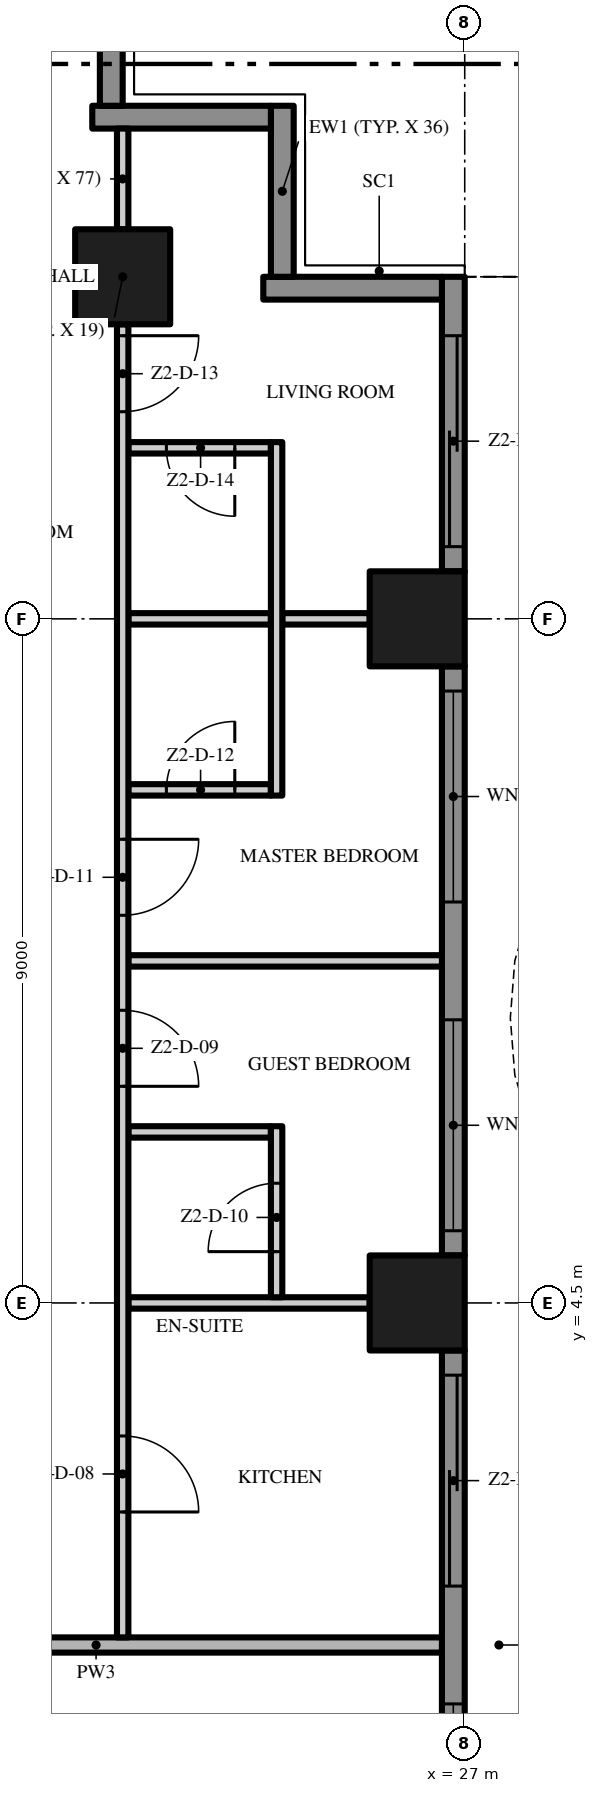
"""IFC4 building model, lengths in metres.
Left out: names, types, materials, properties, quantities, classifications, styles, units other than length and angle.
Written with IfcOpenShell. Run it as: python <this file> out.ifc"""

import sys

from ifc_helpers import new_model, si_unit, direction, frame, frame_2d, origin, origin_2d, place, context, subcontext, project, spatial, polyline, rectangle, outline, extrude, element, fill, save


model = new_model("IFC4")
c1 = context("Model", 3, precision=1e-05, world=origin(), true_north=direction((0.0, 1.0)))
c2 = subcontext(c1, "Body", "Model", "MODEL_VIEW")
j1 = project(units=[si_unit("LENGTHUNIT", "METRE"), si_unit("PLANEANGLEUNIT", "RADIAN")], contexts=[c1])
p1 = place(None, origin())
s1 = spatial("IfcSite", under=j1, at=p1, CompositionType="ELEMENT")
p2 = place(p1, origin())
s2 = spatial("IfcBuilding", under=s1, at=p2, CompositionType="ELEMENT")
p3 = place(p2, frame((0.0, 0.0, 107.4)))
s3 = spatial("IfcBuildingStorey", under=s2, at=p3, CompositionType="ELEMENT", Elevation=107.4)
for number, where, z_axis, x_axis in (
    (1, (26.375, 13.5, 0.0), (0.0, 0.0, 1.0), (1.0, 0.0, 0.0)),
    (2, (22.5, 18.0, 0.0), (0.0, 0.0, 1.0), (1.0, 0.0, 0.0)),
    (3, (26.375, 4.5, 0.0), (0.0, 0.0, 1.0), (1.0, 0.0, 0.0)),
):
    element("IfcColumn", number, at=place(p3, frame(where, z_axis=z_axis, x_axis=x_axis)), inside=s3, PredefinedType="COLUMN", context=c2, shape_type="SweptSolid", body=[
        extrude(rectangle(XDim=1.25, YDim=1.25, at=origin_2d()), origin(), (0.0, 0.0, 1.0), 3.5),
    ])
p4 = place(p3, frame((26.85, 3.875, 0.0), z_axis=(0.0, 0.0, 1.0), x_axis=(0.0, -1.0, 0.0)))
e4 = element("IfcWall", 4, at=p4, inside=s3, PredefinedType="SOLIDWALL", context=c2, shape_type="SweptSolid", body=[
    extrude(rectangle(XDim=7.75, YDim=0.3, at=frame_2d((3.875, 0.0))), origin(), (0.0, 0.0, 1.0), 3.5),
])
p5 = place(p4, frame((4.65, 0.0, 0.45)))
e5 = element("IfcOpeningElement", 5, at=p5, cuts=e4, PredefinedType="OPENING", context=c2, shape_type="SweptSolid", body=[
    extrude(rectangle(XDim=2.775, YDim=2.65, at=frame_2d((1.387, 1.325))), frame((0.0, 0.16, 0.0), z_axis=(0.0, -1.0, 0.0), x_axis=(1.0, 0.0, 0.0)), (0.0, 0.0, 1.0), 0.32),
])
p6 = place(p4, frame((0.325, 0.0, 0.0)))
e6 = element("IfcOpeningElement", 6, at=p6, cuts=e4, PredefinedType="OPENING", context=c2, shape_type="SweptSolid", body=[
    extrude(rectangle(XDim=2.775, YDim=2.4, at=frame_2d((1.387, 1.2))), frame((0.0, 0.16, 0.0), z_axis=(0.0, -1.0, 0.0), x_axis=(1.0, 0.0, 0.0)), (0.0, 0.0, 1.0), 0.32),
])
p7 = place(p3, frame((26.85, 12.875, 0.0), z_axis=(0.0, 0.0, 1.0), x_axis=(0.0, -1.0, 0.0)))
e7 = element("IfcWall", 7, at=p7, inside=s3, PredefinedType="SOLIDWALL", context=c2, shape_type="SweptSolid", body=[
    extrude(rectangle(XDim=7.75, YDim=0.3, at=frame_2d((3.875, 0.0))), origin(), (0.0, 0.0, 1.0), 3.5),
])
p8 = place(p7, frame((4.65, 0.0, 0.45)))
e8 = element("IfcOpeningElement", 8, at=p8, cuts=e7, PredefinedType="OPENING", context=c2, shape_type="SweptSolid", body=[
    extrude(rectangle(XDim=2.775, YDim=2.65, at=frame_2d((1.387, 1.325))), frame((0.0, 0.16, 0.0), z_axis=(0.0, -1.0, 0.0), x_axis=(1.0, 0.0, 0.0)), (0.0, 0.0, 1.0), 0.32),
])
p9 = place(p7, frame((0.325, 0.0, 0.45)))
e9 = element("IfcOpeningElement", 9, at=p9, cuts=e7, PredefinedType="OPENING", context=c2, shape_type="SweptSolid", body=[
    extrude(rectangle(XDim=2.775, YDim=2.65, at=frame_2d((1.387, 1.325))), frame((0.0, 0.16, 0.0), z_axis=(0.0, -1.0, 0.0), x_axis=(1.0, 0.0, 0.0)), (0.0, 0.0, 1.0), 0.32),
])
p10 = place(p3, frame((26.85, 18.0, 0.0), z_axis=(0.0, 0.0, 1.0), x_axis=(0.0, -1.0, 0.0)))
e10 = element("IfcWall", 10, at=p10, inside=s3, PredefinedType="SOLIDWALL", context=c2, shape_type="SweptSolid", body=[
    extrude(rectangle(XDim=3.875, YDim=0.3, at=frame_2d((1.938, 0.0))), origin(), (0.0, 0.0, 1.0), 3.5),
])
p11 = place(p10, frame((0.775, 0.0, 0.0)))
e11 = element("IfcOpeningElement", 11, at=p11, cuts=e10, PredefinedType="OPENING", context=c2, shape_type="SweptSolid", body=[
    extrude(rectangle(XDim=2.775, YDim=2.4, at=frame_2d((1.387, 1.2))), frame((0.0, 0.16, 0.0), z_axis=(0.0, -1.0, 0.0), x_axis=(1.0, 0.0, 0.0)), (0.0, 0.0, 1.0), 0.32),
])
p12 = place(p3, frame((24.35, 17.85, 0.0), z_axis=(0.0, 0.0, 1.0), x_axis=(1.0, 0.0, 0.0)))
e12 = element("IfcWall", 12, at=p12, inside=s3, PredefinedType="SOLIDWALL", context=c2, shape_type="SweptSolid", body=[
    extrude(rectangle(XDim=2.35, YDim=0.3, at=frame_2d((1.175, 0.0))), origin(), (0.0, 0.0, 1.0), 3.5),
])
p13 = place(p3, frame((24.6, 20.25, 0.0), z_axis=(0.0, 0.0, 1.0), x_axis=(0.0, -1.0, 0.0)))
e13 = element("IfcWall", 13, at=p13, inside=s3, PredefinedType="SOLIDWALL", context=c2, shape_type="SweptSolid", body=[
    extrude(rectangle(XDim=2.25, YDim=0.3, at=frame_2d((1.125, 0.0))), origin(), (0.0, 0.0, 1.0), 3.5),
])
p14 = place(p3, frame((22.1, 20.1, 0.0), z_axis=(0.0, 0.0, 1.0), x_axis=(1.0, 0.0, 0.0)))
e14 = element("IfcWall", 14, at=p14, inside=s3, PredefinedType="SOLIDWALL", context=c2, shape_type="SweptSolid", body=[
    extrude(rectangle(XDim=2.35, YDim=0.3, at=frame_2d((1.175, 0.0))), origin(), (0.0, 0.0, 1.0), 3.5),
])
p15 = place(p3, frame((22.35, 22.5, 0.0), z_axis=(0.0, 0.0, 1.0), x_axis=(0.0, -1.0, 0.0)))
e15 = element("IfcWall", 15, at=p15, inside=s3, PredefinedType="SOLIDWALL", context=c2, shape_type="SweptSolid", body=[
    extrude(rectangle(XDim=2.25, YDim=0.3, at=frame_2d((1.125, 0.0))), origin(), (0.0, 0.0, 1.0), 3.5),
])
p16 = place(p3, origin())
e16 = element("IfcWall", 16, at=p16, inside=s3, PredefinedType="USERDEFINED", context=c2, shape_type="SweptSolid", body=[
    extrude(outline(polyline([(28.8, -18.0), (29.505, -16.5), (29.941, -15.0), (30.0, -14.25), (29.941, -13.5), (29.505, -12.0), (28.8, -10.5), (28.095, -9.0), (27.659, -7.5), (27.6, -6.75), (27.659, -6.0), (28.095, -4.5), (28.8, -3.0), (29.505, -1.5), (29.941, 0.0), (30.0, 0.75), (29.941, 1.5), (29.505, 3.0), (28.8, 4.5), (28.095, 6.0), (27.659, 7.5), (27.6, 8.25), (27.659, 9.0), (28.095, 10.5), (28.8, 12.0), (29.505, 13.5), (29.941, 15.0), (30.0, 15.75), (29.941, 16.5), (29.505, 18.0), (29.265, 17.93), (29.694, 16.455), (29.749, 15.75), (29.694, 15.045), (29.271, 13.589), (28.574, 12.106), (27.86, 10.589), (27.411, 9.045), (27.349, 8.25), (27.411, 7.455), (27.86, 5.911), (28.574, 4.394), (29.271, 2.911), (29.694, 1.455), (29.749, 0.75), (29.694, 0.045), (29.271, -1.411), (28.574, -2.894), (27.86, -4.411), (27.411, -5.955), (27.349, -6.75), (27.411, -7.545), (27.86, -9.089), (28.574, -10.606), (29.271, -12.089), (29.694, -13.545), (29.749, -14.25), (29.694, -14.955), (29.271, -16.411), (28.574, -17.894), (28.8, -18.0)])), origin(), (0.0, 0.0, 1.0), 0.9),
])
p17 = place(p3, frame((17.6, 0.0, 0.0), z_axis=(0.0, 0.0, 1.0), x_axis=(1.0, 0.0, 0.0)))
e17 = element("IfcWall", 17, at=p17, inside=s3, PredefinedType="PARTITIONING", context=c2, shape_type="SweptSolid", body=[
    extrude(rectangle(XDim=9.1, YDim=0.2, at=frame_2d((4.55, 0.0))), origin(), (0.0, 0.0, 1.0), 3.5),
])
p18 = place(p3, frame((22.575, 4.5, 0.0), z_axis=(0.0, 0.0, 1.0), x_axis=(1.0, 0.0, 0.0)))
e18 = element("IfcWall", 18, at=p18, inside=s3, PredefinedType="PARTITIONING", context=c2, shape_type="SweptSolid", body=[
    extrude(rectangle(XDim=3.175, YDim=0.15, at=frame_2d((1.587, 0.0))), origin(), (0.0, 0.0, 1.0), 3.5),
])
p19 = place(p3, frame((22.575, 6.75, 0.0), z_axis=(0.0, 0.0, 1.0), x_axis=(1.0, 0.0, 0.0)))
e19 = element("IfcWall", 19, at=p19, inside=s3, PredefinedType="PARTITIONING", context=c2, shape_type="SweptSolid", body=[
    extrude(rectangle(XDim=1.875, YDim=0.15, at=frame_2d((0.938, 0.0))), origin(), (0.0, 0.0, 1.0), 3.5),
])
p20 = place(p3, frame((22.575, 9.0, 0.0), z_axis=(0.0, 0.0, 1.0), x_axis=(1.0, 0.0, 0.0)))
e20 = element("IfcWall", 20, at=p20, inside=s3, PredefinedType="PARTITIONING", context=c2, shape_type="SweptSolid", body=[
    extrude(rectangle(XDim=4.125, YDim=0.15, at=frame_2d((2.062, 0.0))), origin(), (0.0, 0.0, 1.0), 3.5),
])
p21 = place(p3, frame((22.575, 11.25, 0.0), z_axis=(0.0, 0.0, 1.0), x_axis=(1.0, 0.0, 0.0)))
e21 = element("IfcWall", 21, at=p21, inside=s3, PredefinedType="PARTITIONING", context=c2, shape_type="SweptSolid", body=[
    extrude(rectangle(XDim=1.875, YDim=0.15, at=frame_2d((0.938, 0.0))), origin(), (0.0, 0.0, 1.0), 3.5),
])
p22 = place(p21, frame((0.5, 0.0, 0.0)))
e22 = element("IfcOpeningElement", 22, at=p22, cuts=e21, PredefinedType="OPENING", context=c2, shape_type="SweptSolid", body=[
    extrude(rectangle(XDim=0.9, YDim=2.1, at=frame_2d((0.45, 1.05))), frame((0.0, 0.085, 0.0), z_axis=(0.0, -1.0, 0.0), x_axis=(1.0, 0.0, 0.0)), (0.0, 0.0, 1.0), 0.17),
])
p23 = place(p3, frame((22.575, 13.5, 0.0), z_axis=(0.0, 0.0, 1.0), x_axis=(1.0, 0.0, 0.0)))
e23 = element("IfcWall", 23, at=p23, inside=s3, PredefinedType="PARTITIONING", context=c2, shape_type="SweptSolid", body=[
    extrude(rectangle(XDim=1.875, YDim=0.15, at=frame_2d((0.938, 0.0))), origin(), (0.0, 0.0, 1.0), 3.5),
])
p24 = place(p3, frame((24.6, 13.5, 0.0), z_axis=(0.0, 0.0, 1.0), x_axis=(1.0, 0.0, 0.0)))
e24 = element("IfcWall", 24, at=p24, inside=s3, PredefinedType="PARTITIONING", context=c2, shape_type="SweptSolid", body=[
    extrude(rectangle(XDim=1.15, YDim=0.15, at=frame_2d((0.575, 0.0))), origin(), (0.0, 0.0, 1.0), 3.5),
])
p25 = place(p3, frame((24.45, 15.75, 0.0), z_axis=(0.0, 0.0, 1.0), x_axis=(-1.0, 0.0, 0.0)))
e25 = element("IfcWall", 25, at=p25, inside=s3, PredefinedType="PARTITIONING", context=c2, shape_type="SweptSolid", body=[
    extrude(rectangle(XDim=1.875, YDim=0.15, at=frame_2d((0.938, 0.0))), origin(), (0.0, 0.0, 1.0), 3.5),
])
p26 = place(p25, frame((0.475, 0.0, 0.0)))
e26 = element("IfcOpeningElement", 26, at=p26, cuts=e25, PredefinedType="OPENING", context=c2, shape_type="SweptSolid", body=[
    extrude(rectangle(XDim=0.9, YDim=2.1, at=frame_2d((0.45, 1.05))), frame((0.0, 0.085, 0.0), z_axis=(0.0, -1.0, 0.0), x_axis=(1.0, 0.0, 0.0)), (0.0, 0.0, 1.0), 0.17),
])
p27 = place(p3, frame((22.5, 17.375, 0.0), z_axis=(0.0, 0.0, 1.0), x_axis=(0.0, -1.0, 0.0)))
e27 = element("IfcWall", 27, at=p27, inside=s3, PredefinedType="PARTITIONING", context=c2, shape_type="SweptSolid", body=[
    extrude(rectangle(XDim=17.275, YDim=0.15, at=frame_2d((8.637, 0.0))), origin(), (0.0, 0.0, 1.0), 3.5),
])
p28 = place(p27, frame((14.625, 0.0, 0.0)))
e28 = element("IfcOpeningElement", 28, at=p28, cuts=e27, PredefinedType="OPENING", context=c2, shape_type="SweptSolid", body=[
    extrude(rectangle(XDim=1.0, YDim=2.4, at=frame_2d((0.5, 1.2))), frame((0.0, 0.085, 0.0), z_axis=(0.0, -1.0, 0.0), x_axis=(1.0, 0.0, 0.0)), (0.0, 0.0, 1.0), 0.17),
])
p29 = place(p27, frame((9.025, 0.0, 0.0)))
e29 = element("IfcOpeningElement", 29, at=p29, cuts=e27, PredefinedType="OPENING", context=c2, shape_type="SweptSolid", body=[
    extrude(rectangle(XDim=1.0, YDim=2.4, at=frame_2d((0.5, 1.2))), frame((0.0, 0.085, 0.0), z_axis=(0.0, -1.0, 0.0), x_axis=(1.0, 0.0, 0.0)), (0.0, 0.0, 1.0), 0.17),
])
p30 = place(p27, frame((6.775, 0.0, 0.0)))
e30 = element("IfcOpeningElement", 30, at=p30, cuts=e27, PredefinedType="OPENING", context=c2, shape_type="SweptSolid", body=[
    extrude(rectangle(XDim=1.0, YDim=2.4, at=frame_2d((0.5, 1.2))), frame((0.0, 0.085, 0.0), z_axis=(0.0, -1.0, 0.0), x_axis=(1.0, 0.0, 0.0)), (0.0, 0.0, 1.0), 0.17),
])
p31 = place(p27, frame((0.15, 0.0, 0.0)))
e31 = element("IfcOpeningElement", 31, at=p31, cuts=e27, PredefinedType="OPENING", context=c2, shape_type="SweptSolid", body=[
    extrude(rectangle(XDim=1.0, YDim=2.4, at=frame_2d((0.5, 1.2))), frame((0.0, 0.085, 0.0), z_axis=(0.0, -1.0, 0.0), x_axis=(1.0, 0.0, 0.0)), (0.0, 0.0, 1.0), 0.17),
])
p32 = place(p3, frame((22.5, 18.625, 0.0), z_axis=(0.0, 0.0, 1.0), x_axis=(0.0, 1.0, 0.0)))
e32 = element("IfcWall", 32, at=p32, inside=s3, PredefinedType="PARTITIONING", context=c2, shape_type="SweptSolid", body=[
    extrude(rectangle(XDim=1.325, YDim=0.15, at=frame_2d((0.662, 0.0))), origin(), (0.0, 0.0, 1.0), 3.5),
])
p33 = place(p3, frame((24.525, 4.575, 0.0), z_axis=(0.0, 0.0, 1.0), x_axis=(0.0, 1.0, 0.0)))
e33 = element("IfcWall", 33, at=p33, inside=s3, PredefinedType="PARTITIONING", context=c2, shape_type="SweptSolid", body=[
    extrude(rectangle(XDim=2.25, YDim=0.15, at=frame_2d((1.125, 0.0))), origin(), (0.0, 0.0, 1.0), 3.5),
])
p34 = place(p33, frame((0.6, 0.0, 0.0)))
e34 = element("IfcOpeningElement", 34, at=p34, cuts=e33, PredefinedType="OPENING", context=c2, shape_type="SweptSolid", body=[
    extrude(rectangle(XDim=0.9, YDim=2.1, at=frame_2d((0.45, 1.05))), frame((0.0, 0.085, 0.0), z_axis=(0.0, -1.0, 0.0), x_axis=(1.0, 0.0, 0.0)), (0.0, 0.0, 1.0), 0.17),
])
p35 = place(p3, frame((24.525, 11.175, 0.0), z_axis=(0.0, 0.0, 1.0), x_axis=(0.0, 1.0, 0.0)))
e35 = element("IfcWall", 35, at=p35, inside=s3, PredefinedType="PARTITIONING", context=c2, shape_type="SweptSolid", body=[
    extrude(rectangle(XDim=4.65, YDim=0.15, at=frame_2d((2.325, 0.0))), origin(), (0.0, 0.0, 1.0), 3.5),
])
p36 = place(p5, origin())
e36 = element("IfcWindow", 36, at=p36, inside=s3, PartitioningType="SINGLE_PANEL", PredefinedType="WINDOW", context=c2, shape_type="SweptSolid", body=[
    extrude(rectangle(XDim=2.775, YDim=2.65, at=frame_2d((1.387, 1.325))), frame((0.0, 0.03, 0.0), z_axis=(0.0, -1.0, 0.0), x_axis=(1.0, 0.0, 0.0)), (0.0, 0.0, 1.0), 0.06),
])
fill(e5, e36)
p37 = place(p6, origin())
e37 = element("IfcDoor", 37, at=p37, inside=s3, OperationType="SINGLE_SWING_LEFT", PredefinedType="DOOR", context=c2, shape_type="SweptSolid", body=[
    extrude(rectangle(XDim=2.775, YDim=2.4, at=frame_2d((1.387, 1.2))), frame((0.0, 0.025, 0.0), z_axis=(0.0, -1.0, 0.0), x_axis=(1.0, 0.0, 0.0)), (0.0, 0.0, 1.0), 0.05),
])
fill(e6, e37)
p38 = place(p8, origin())
e38 = element("IfcWindow", 38, at=p38, inside=s3, PartitioningType="SINGLE_PANEL", PredefinedType="WINDOW", context=c2, shape_type="SweptSolid", body=[
    extrude(rectangle(XDim=2.775, YDim=2.65, at=frame_2d((1.387, 1.325))), frame((0.0, 0.03, 0.0), z_axis=(0.0, -1.0, 0.0), x_axis=(1.0, 0.0, 0.0)), (0.0, 0.0, 1.0), 0.06),
])
fill(e8, e38)
p39 = place(p9, origin())
e39 = element("IfcWindow", 39, at=p39, inside=s3, PartitioningType="SINGLE_PANEL", PredefinedType="WINDOW", context=c2, shape_type="SweptSolid", body=[
    extrude(rectangle(XDim=2.775, YDim=2.65, at=frame_2d((1.387, 1.325))), frame((0.0, 0.03, 0.0), z_axis=(0.0, -1.0, 0.0), x_axis=(1.0, 0.0, 0.0)), (0.0, 0.0, 1.0), 0.06),
])
fill(e9, e39)
p40 = place(p11, origin())
e40 = element("IfcDoor", 40, at=p40, inside=s3, OperationType="SINGLE_SWING_LEFT", PredefinedType="DOOR", context=c2, shape_type="SweptSolid", body=[
    extrude(rectangle(XDim=2.775, YDim=2.4, at=frame_2d((1.387, 1.2))), frame((0.0, 0.025, 0.0), z_axis=(0.0, -1.0, 0.0), x_axis=(1.0, 0.0, 0.0)), (0.0, 0.0, 1.0), 0.05),
])
fill(e11, e40)
p41 = place(p28, origin())
e41 = element("IfcDoor", 41, at=p41, inside=s3, OperationType="SINGLE_SWING_RIGHT", PredefinedType="DOOR", context=c2, shape_type="SweptSolid", body=[
    extrude(rectangle(XDim=1.0, YDim=2.4, at=frame_2d((0.5, 1.2))), frame((0.0, 0.025, 0.0), z_axis=(0.0, -1.0, 0.0), x_axis=(1.0, 0.0, 0.0)), (0.0, 0.0, 1.0), 0.05),
])
fill(e28, e41)
p42 = place(p29, origin())
e42 = element("IfcDoor", 42, at=p42, inside=s3, OperationType="SINGLE_SWING_RIGHT", PredefinedType="DOOR", context=c2, shape_type="SweptSolid", body=[
    extrude(rectangle(XDim=1.0, YDim=2.4, at=frame_2d((0.5, 1.2))), frame((0.0, 0.025, 0.0), z_axis=(0.0, -1.0, 0.0), x_axis=(1.0, 0.0, 0.0)), (0.0, 0.0, 1.0), 0.05),
])
fill(e29, e42)
p43 = place(p34, origin())
e43 = element("IfcDoor", 43, at=p43, inside=s3, OperationType="SINGLE_SWING_LEFT", PredefinedType="DOOR", context=c2, shape_type="SweptSolid", body=[
    extrude(rectangle(XDim=0.9, YDim=2.1, at=frame_2d((0.45, 1.05))), frame((0.0, 0.025, 0.0), z_axis=(0.0, -1.0, 0.0), x_axis=(1.0, 0.0, 0.0)), (0.0, 0.0, 1.0), 0.05),
])
fill(e34, e43)
p44 = place(p30, origin())
e44 = element("IfcDoor", 44, at=p44, inside=s3, OperationType="SINGLE_SWING_LEFT", PredefinedType="DOOR", context=c2, shape_type="SweptSolid", body=[
    extrude(rectangle(XDim=1.0, YDim=2.4, at=frame_2d((0.5, 1.2))), frame((0.0, 0.025, 0.0), z_axis=(0.0, -1.0, 0.0), x_axis=(1.0, 0.0, 0.0)), (0.0, 0.0, 1.0), 0.05),
])
fill(e30, e44)
p45 = place(p22, origin())
e45 = element("IfcDoor", 45, at=p45, inside=s3, OperationType="SINGLE_SWING_RIGHT", PredefinedType="DOOR", context=c2, shape_type="SweptSolid", body=[
    extrude(rectangle(XDim=0.9, YDim=2.1, at=frame_2d((0.45, 1.05))), frame((0.0, 0.025, 0.0), z_axis=(0.0, -1.0, 0.0), x_axis=(1.0, 0.0, 0.0)), (0.0, 0.0, 1.0), 0.05),
])
fill(e22, e45)
p46 = place(p31, origin())
e46 = element("IfcDoor", 46, at=p46, inside=s3, OperationType="SINGLE_SWING_LEFT", PredefinedType="DOOR", context=c2, shape_type="SweptSolid", body=[
    extrude(rectangle(XDim=1.0, YDim=2.4, at=frame_2d((0.5, 1.2))), frame((0.0, 0.025, 0.0), z_axis=(0.0, -1.0, 0.0), x_axis=(1.0, 0.0, 0.0)), (0.0, 0.0, 1.0), 0.05),
])
fill(e31, e46)
p47 = place(p26, origin())
e47 = element("IfcDoor", 47, at=p47, inside=s3, OperationType="SINGLE_SWING_LEFT", PredefinedType="DOOR", context=c2, shape_type="SweptSolid", body=[
    extrude(rectangle(XDim=0.9, YDim=2.1, at=frame_2d((0.45, 1.05))), frame((0.0, 0.025, 0.0), z_axis=(0.0, -1.0, 0.0), x_axis=(1.0, 0.0, 0.0)), (0.0, 0.0, 1.0), 0.05),
])
fill(e26, e47)
save(model, sys.argv[1])
